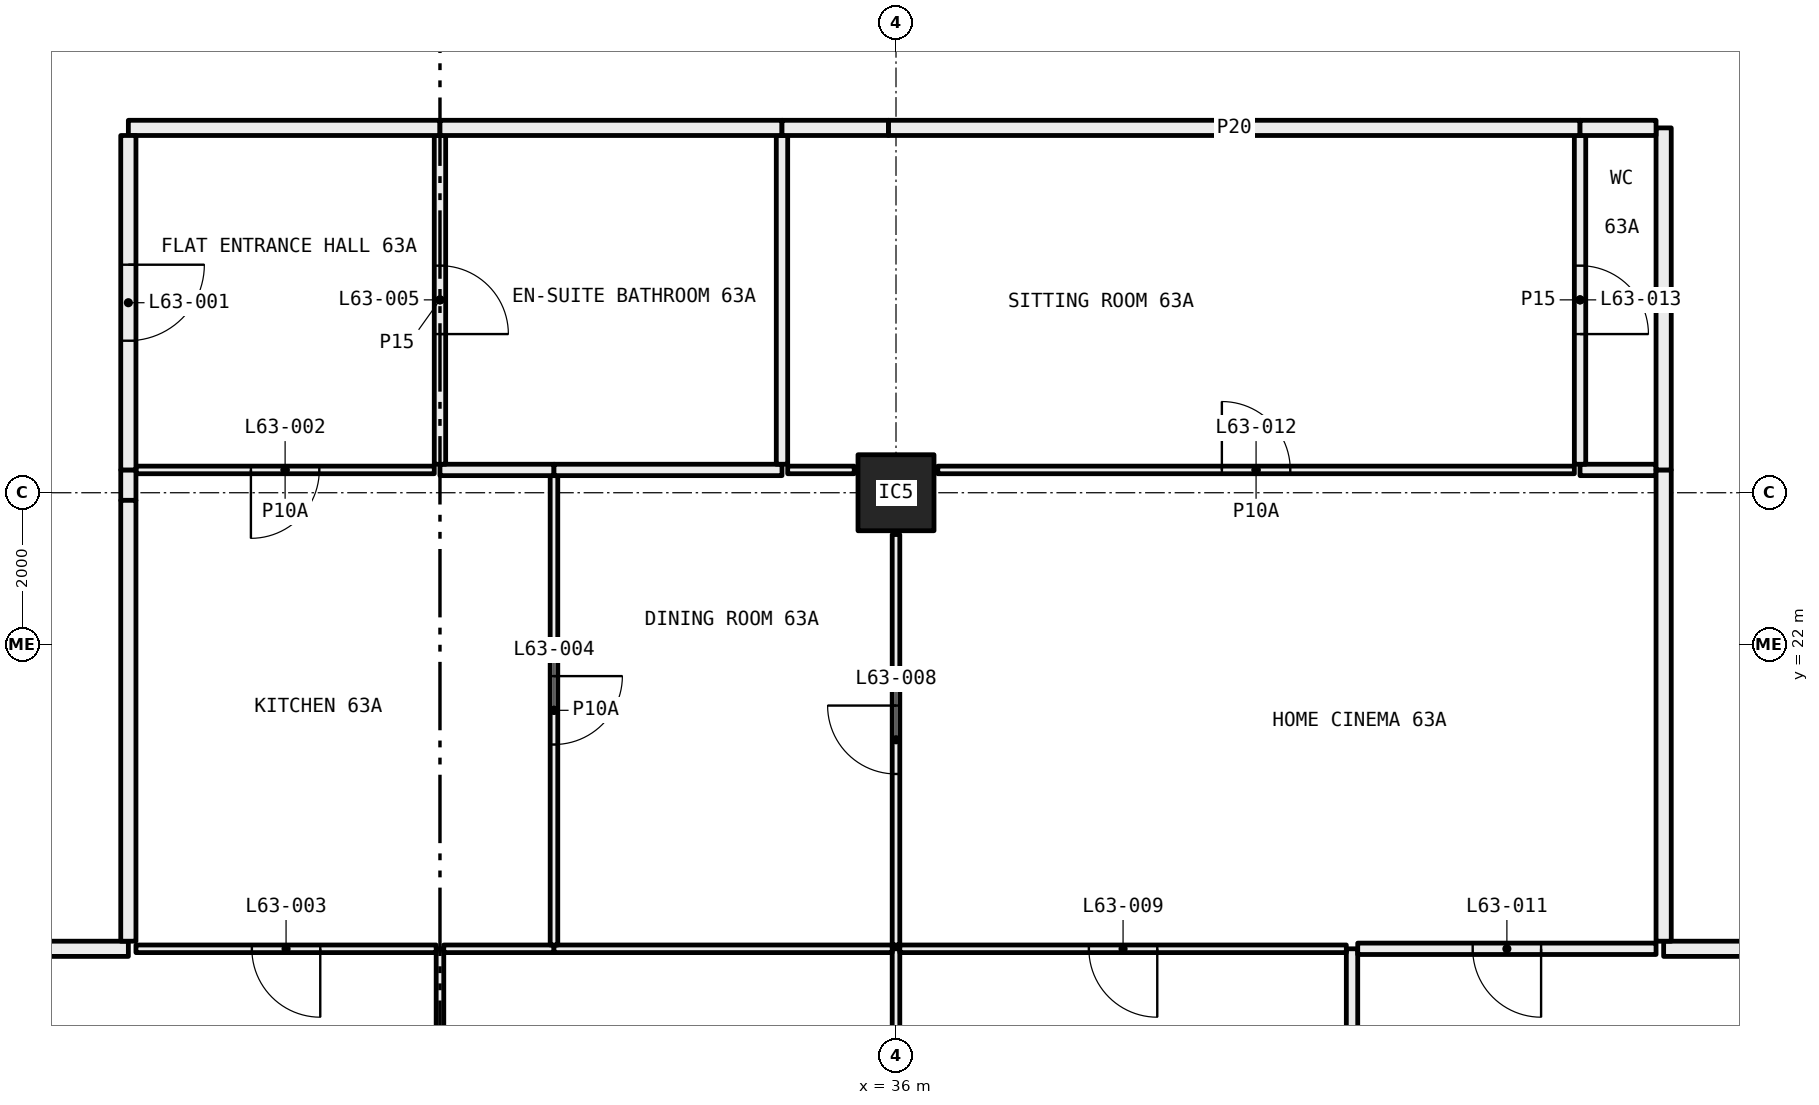
"""IFC4 building model, lengths in metres.
Left out: names, types, materials, properties, quantities, classifications, styles, units other than length and angle.
Written with IfcOpenShell. Run it as: python <this file> out.ifc"""

import sys

from ifc_helpers import new_model, si_unit, direction, frame, frame_2d, origin, origin_2d, place, context, subcontext, project, spatial, rectangle, hollow_rectangle, extrude, element, fill, save


model = new_model("IFC4")
c1 = context("Model", 3, precision=1e-05, world=origin(), true_north=direction((0.0, 1.0)))
c2 = subcontext(c1, "Body", "Model", "MODEL_VIEW")
j1 = project(units=[si_unit("LENGTHUNIT", "METRE"), si_unit("PLANEANGLEUNIT", "RADIAN")], contexts=[c1])
p1 = place(None, origin())
s1 = spatial("IfcSite", under=j1, at=p1, CompositionType="ELEMENT")
p2 = place(p1, origin())
s2 = spatial("IfcBuilding", under=s1, at=p2, CompositionType="ELEMENT")
p3 = place(p2, frame((0.0, 0.0, 235.2)))
s3 = spatial("IfcBuildingStorey", under=s2, at=p3, CompositionType="ELEMENT", Elevation=235.2)
p4 = place(p3, frame((36.0, 24.0, 0.0), z_axis=(0.0, 0.0, 1.0), x_axis=(1.0, 0.0, 0.0)))
e1 = element("IfcColumn", 1, at=p4, inside=s3, PredefinedType="COLUMN", context=c2, shape_type="SweptSolid", body=[
    extrude(hollow_rectangle(XDim=1.0, YDim=1.0, WallThickness=0.04, at=origin_2d()), origin(), (0.0, 0.0, 1.0), 3.05),
])
p5 = place(p3, frame((30.0, 12.72, 0.0), z_axis=(0.0, 0.0, 1.0), x_axis=(0.0, 1.0, 0.0)))
e2 = element("IfcWall", 2, at=p5, inside=s3, PredefinedType="PARTITIONING", context=c2, shape_type="SweptSolid", body=[
    extrude(rectangle(XDim=5.28, YDim=0.1, at=frame_2d((2.64, 0.0))), origin(), (0.0, 0.0, 1.0), 3.05),
])
p6 = place(p5, frame((2.19, 0.0, 0.0)))
e3 = element("IfcOpeningElement", 3, at=p6, cuts=e2, PredefinedType="OPENING", context=c2, shape_type="SweptSolid", body=[
    extrude(rectangle(XDim=0.9, YDim=2.1, at=frame_2d((0.45, 1.05))), frame((0.0, 0.06, 0.0), z_axis=(0.0, -1.0, 0.0), x_axis=(1.0, 0.0, 0.0)), (0.0, 0.0, 1.0), 0.12),
])
p7 = place(p3, frame((29.95, 18.0, 0.0), z_axis=(0.0, 0.0, 1.0), x_axis=(-1.0, 0.0, 0.0)))
e4 = element("IfcWall", 4, at=p7, inside=s3, PredefinedType="PARTITIONING", context=c2, shape_type="SweptSolid", body=[
    extrude(rectangle(XDim=3.95, YDim=0.1, at=frame_2d((1.975, 0.0))), origin(), (0.0, 0.0, 1.0), 3.05),
])
p8 = place(p7, frame((1.525, 0.0, 0.0)))
e5 = element("IfcOpeningElement", 5, at=p8, cuts=e4, PredefinedType="OPENING", context=c2, shape_type="SweptSolid", body=[
    extrude(rectangle(XDim=0.9, YDim=2.1, at=frame_2d((0.45, 1.05))), frame((0.0, 0.06, 0.0), z_axis=(0.0, -1.0, 0.0), x_axis=(1.0, 0.0, 0.0)), (0.0, 0.0, 1.0), 0.12),
])
p9 = place(p3, frame((25.9, 18.0, 0.0), z_axis=(0.0, 0.0, 1.0), x_axis=(-1.0, 0.0, 0.0)))
e6 = element("IfcWall", 6, at=p9, inside=s3, PredefinedType="PARTITIONING", context=c2, shape_type="SweptSolid", body=[
    extrude(rectangle(XDim=1.9, YDim=0.2, at=frame_2d((0.95, 0.0))), origin(), (0.0, 0.0, 1.0), 3.05),
])
p10 = place(p3, frame((36.0, 12.72, 0.0), z_axis=(0.0, 0.0, 1.0), x_axis=(0.0, 1.0, 0.0)))
e7 = element("IfcWall", 7, at=p10, inside=s3, PredefinedType="PARTITIONING", context=c2, shape_type="SweptSolid", body=[
    extrude(rectangle(XDim=5.28, YDim=0.1, at=frame_2d((2.64, 0.0))), origin(), (0.0, 0.0, 1.0), 2.45),
])
p11 = place(p3, frame((31.5, 18.0, 0.0), z_axis=(0.0, 0.0, 1.0), x_axis=(-1.0, 0.0, 0.0)))
e8 = element("IfcWall", 8, at=p11, inside=s3, PredefinedType="PARTITIONING", context=c2, shape_type="SweptSolid", body=[
    extrude(rectangle(XDim=1.45, YDim=0.1, at=frame_2d((0.725, 0.0))), origin(), (0.0, 0.0, 1.0), 3.05),
])
p12 = place(p3, frame((35.95, 18.0, 0.0), z_axis=(0.0, 0.0, 1.0), x_axis=(-1.0, 0.0, 0.0)))
e9 = element("IfcWall", 9, at=p12, inside=s3, PredefinedType="PARTITIONING", context=c2, shape_type="SweptSolid", body=[
    extrude(rectangle(XDim=4.45, YDim=0.1, at=frame_2d((2.225, 0.0))), origin(), (0.0, 0.0, 1.0), 2.45),
])
p13 = place(p3, frame((42.0, 15.0, 0.0), z_axis=(0.0, 0.0, 1.0), x_axis=(0.0, 1.0, 0.0)))
e10 = element("IfcWall", 10, at=p13, inside=s3, PredefinedType="PARTITIONING", context=c2, shape_type="SweptSolid", body=[
    extrude(rectangle(XDim=3.0, YDim=0.15, at=frame_2d((1.5, 0.0))), origin(), (0.0, 0.0, 1.0), 3.05),
])
p14 = place(p3, frame((41.925, 18.0, 0.0), z_axis=(0.0, 0.0, 1.0), x_axis=(-1.0, 0.0, 0.0)))
e11 = element("IfcWall", 11, at=p14, inside=s3, PredefinedType="PARTITIONING", context=c2, shape_type="SweptSolid", body=[
    extrude(rectangle(XDim=5.875, YDim=0.1, at=frame_2d((2.938, 0.0))), origin(), (0.0, 0.0, 1.0), 2.45),
])
p15 = place(p14, frame((2.488, 0.0, 0.0)))
e12 = element("IfcOpeningElement", 12, at=p15, cuts=e11, PredefinedType="OPENING", context=c2, shape_type="SweptSolid", body=[
    extrude(rectangle(XDim=0.9, YDim=2.1, at=frame_2d((0.45, 1.05))), frame((0.0, 0.06, 0.0), z_axis=(0.0, -1.0, 0.0), x_axis=(1.0, 0.0, 0.0)), (0.0, 0.0, 1.0), 0.12),
])
p16 = place(p3, frame((46.0, 18.0, 0.0), z_axis=(0.0, 0.0, 1.0), x_axis=(-1.0, 0.0, 0.0)))
e13 = element("IfcWall", 13, at=p16, inside=s3, PredefinedType="PARTITIONING", context=c2, shape_type="SweptSolid", body=[
    extrude(rectangle(XDim=3.925, YDim=0.15, at=frame_2d((1.962, 0.0))), origin(), (0.0, 0.0, 1.0), 3.05),
])
p17 = place(p16, frame((1.512, 0.0, 0.0)))
e14 = element("IfcOpeningElement", 14, at=p17, cuts=e13, PredefinedType="OPENING", context=c2, shape_type="SweptSolid", body=[
    extrude(rectangle(XDim=0.9, YDim=2.1, at=frame_2d((0.45, 1.05))), frame((0.0, 0.085, 0.0), z_axis=(0.0, -1.0, 0.0), x_axis=(1.0, 0.0, 0.0)), (0.0, 0.0, 1.0), 0.17),
])
p18 = place(p3, frame((47.9, 18.0, 0.0), z_axis=(0.0, 0.0, 1.0), x_axis=(-1.0, 0.0, 0.0)))
e15 = element("IfcWall", 15, at=p18, inside=s3, PredefinedType="PARTITIONING", context=c2, shape_type="SweptSolid", body=[
    extrude(rectangle(XDim=1.8, YDim=0.2, at=frame_2d((0.9, 0.0))), origin(), (0.0, 0.0, 1.0), 3.05),
])
p19 = place(p3, frame((31.5, 18.05, 0.0), z_axis=(0.0, 0.0, 1.0), x_axis=(0.0, 1.0, 0.0)))
e16 = element("IfcWall", 16, at=p19, inside=s3, PredefinedType="PARTITIONING", context=c2, shape_type="SweptSolid", body=[
    extrude(rectangle(XDim=6.175, YDim=0.1, at=frame_2d((3.087, 0.0))), origin(), (0.0, 0.0, 1.0), 2.45),
])
p20 = place(p19, frame((2.637, 0.0, 0.0)))
e17 = element("IfcOpeningElement", 17, at=p20, cuts=e16, PredefinedType="OPENING", context=c2, shape_type="SweptSolid", body=[
    extrude(rectangle(XDim=0.9, YDim=2.1, at=frame_2d((0.45, 1.05))), frame((0.0, 0.06, 0.0), z_axis=(0.0, -1.0, 0.0), x_axis=(1.0, 0.0, 0.0)), (0.0, 0.0, 1.0), 0.12),
])
p21 = place(p3, frame((29.925, 24.3, 0.0), z_axis=(0.0, 0.0, 1.0), x_axis=(-1.0, 0.0, 0.0)))
e18 = element("IfcWall", 18, at=p21, inside=s3, PredefinedType="PARTITIONING", context=c2, shape_type="SweptSolid", body=[
    extrude(rectangle(XDim=3.925, YDim=0.1, at=frame_2d((1.962, 0.0))), origin(), (0.0, 0.0, 1.0), 3.05),
])
p22 = place(p21, frame((1.512, 0.0, 0.0)))
e19 = element("IfcOpeningElement", 19, at=p22, cuts=e18, PredefinedType="OPENING", context=c2, shape_type="SweptSolid", body=[
    extrude(rectangle(XDim=0.9, YDim=2.1, at=frame_2d((0.45, 1.05))), frame((0.0, 0.06, 0.0), z_axis=(0.0, -1.0, 0.0), x_axis=(1.0, 0.0, 0.0)), (0.0, 0.0, 1.0), 0.12),
])
p23 = place(p3, frame((31.5, 24.3, 0.0), z_axis=(0.0, 0.0, 1.0), x_axis=(-1.0, 0.0, 0.0)))
e20 = element("IfcWall", 20, at=p23, inside=s3, PredefinedType="PARTITIONING", context=c2, shape_type="SweptSolid", body=[
    extrude(rectangle(XDim=1.5, YDim=0.15, at=frame_2d((0.75, 0.0))), origin(), (0.0, 0.0, 1.0), 3.05),
])
p24 = place(p3, frame((25.9, 24.3, 0.0), z_axis=(0.0, 0.0, 1.0), x_axis=(0.0, -1.0, 0.0)))
e21 = element("IfcWall", 21, at=p24, inside=s3, PredefinedType="PARTITIONING", context=c2, shape_type="SweptSolid", body=[
    extrude(rectangle(XDim=0.4, YDim=0.2, at=frame_2d((0.2, 0.0))), origin(), (0.0, 0.0, 1.0), 2.45),
])
p25 = place(p3, frame((25.9, 23.9, 0.0), z_axis=(0.0, 0.0, 1.0), x_axis=(0.0, -1.0, 0.0)))
e22 = element("IfcWall", 22, at=p25, inside=s3, PredefinedType="PARTITIONING", context=c2, shape_type="SweptSolid", body=[
    extrude(rectangle(XDim=5.8, YDim=0.2, at=frame_2d((2.9, 0.0))), origin(), (0.0, 0.0, 1.0), 3.05),
])
p26 = place(p3, frame((36.0, 18.05, 0.0), z_axis=(0.0, 0.0, 1.0), x_axis=(0.0, 1.0, 0.0)))
e23 = element("IfcWall", 23, at=p26, inside=s3, PredefinedType="PARTITIONING", context=c2, shape_type="SweptSolid", body=[
    extrude(rectangle(XDim=5.4, YDim=0.1, at=frame_2d((2.7, 0.0))), origin(), (0.0, 0.0, 1.0), 2.45),
])
p27 = place(p26, frame((2.25, 0.0, 0.0)))
e24 = element("IfcOpeningElement", 24, at=p27, cuts=e23, PredefinedType="OPENING", context=c2, shape_type="SweptSolid", body=[
    extrude(rectangle(XDim=0.9, YDim=2.1, at=frame_2d((0.45, 1.05))), frame((0.0, 0.06, 0.0), z_axis=(0.0, -1.0, 0.0), x_axis=(1.0, 0.0, 0.0)), (0.0, 0.0, 1.0), 0.12),
])
p28 = place(p3, frame((34.5, 24.3, 0.0), z_axis=(0.0, 0.0, 1.0), x_axis=(-1.0, 0.0, 0.0)))
e25 = element("IfcWall", 25, at=p28, inside=s3, PredefinedType="PARTITIONING", context=c2, shape_type="SweptSolid", body=[
    extrude(rectangle(XDim=3.0, YDim=0.15, at=frame_2d((1.5, 0.0))), origin(), (0.0, 0.0, 1.0), 3.05),
])
p29 = place(p3, frame((35.45, 24.3, 0.0), z_axis=(0.0, 0.0, 1.0), x_axis=(-1.0, 0.0, 0.0)))
e26 = element("IfcWall", 26, at=p29, inside=s3, PredefinedType="PARTITIONING", context=c2, shape_type="SweptSolid", body=[
    extrude(rectangle(XDim=0.875, YDim=0.1, at=frame_2d((0.438, 0.0))), origin(), (0.0, 0.0, 1.0), 3.05),
])
p30 = place(p3, frame((44.925, 24.3, 0.0), z_axis=(0.0, 0.0, 1.0), x_axis=(-1.0, 0.0, 0.0)))
e27 = element("IfcWall", 27, at=p30, inside=s3, PredefinedType="PARTITIONING", context=c2, shape_type="SweptSolid", body=[
    extrude(rectangle(XDim=8.375, YDim=0.1, at=frame_2d((4.188, 0.0))), origin(), (0.0, 0.0, 1.0), 3.05),
])
p31 = place(p30, frame((3.738, 0.0, 0.0)))
e28 = element("IfcOpeningElement", 28, at=p31, cuts=e27, PredefinedType="OPENING", context=c2, shape_type="SweptSolid", body=[
    extrude(rectangle(XDim=0.9, YDim=2.1, at=frame_2d((0.45, 1.05))), frame((0.0, 0.06, 0.0), z_axis=(0.0, -1.0, 0.0), x_axis=(1.0, 0.0, 0.0)), (0.0, 0.0, 1.0), 0.12),
])
p32 = place(p3, frame((46.0, 24.3, 0.0), z_axis=(0.0, 0.0, 1.0), x_axis=(-1.0, 0.0, 0.0)))
e29 = element("IfcWall", 29, at=p32, inside=s3, PredefinedType="PARTITIONING", context=c2, shape_type="SweptSolid", body=[
    extrude(rectangle(XDim=1.0, YDim=0.15, at=frame_2d((0.5, 0.0))), origin(), (0.0, 0.0, 1.0), 3.05),
])
p33 = place(p3, frame((46.1, 18.1, 0.0), z_axis=(0.0, 0.0, 1.0), x_axis=(0.0, 1.0, 0.0)))
e30 = element("IfcWall", 30, at=p33, inside=s3, PredefinedType="PARTITIONING", context=c2, shape_type="SweptSolid", body=[
    extrude(rectangle(XDim=6.2, YDim=0.2, at=frame_2d((3.1, 0.0))), origin(), (0.0, 0.0, 1.0), 2.45),
])
p34 = place(p3, frame((30.0, 24.375, 0.0), z_axis=(0.0, 0.0, 1.0), x_axis=(0.0, 1.0, 0.0)))
e31 = element("IfcWall", 31, at=p34, inside=s3, PredefinedType="PARTITIONING", context=c2, shape_type="SweptSolid", body=[
    extrude(rectangle(XDim=4.325, YDim=0.15, at=frame_2d((2.163, 0.0))), origin(), (0.0, 0.0, 1.0), 3.05),
])
p35 = place(p34, frame((1.712, 0.0, 0.0)))
e32 = element("IfcOpeningElement", 32, at=p35, cuts=e31, PredefinedType="OPENING", context=c2, shape_type="SweptSolid", body=[
    extrude(rectangle(XDim=0.9, YDim=2.1, at=frame_2d((0.45, 1.05))), frame((0.0, 0.085, 0.0), z_axis=(0.0, -1.0, 0.0), x_axis=(1.0, 0.0, 0.0)), (0.0, 0.0, 1.0), 0.17),
])
p36 = place(p3, frame((30.0, 28.8, 0.0), z_axis=(0.0, 0.0, 1.0), x_axis=(-1.0, 0.0, 0.0)))
e33 = element("IfcWall", 33, at=p36, inside=s3, PredefinedType="PARTITIONING", context=c2, shape_type="SweptSolid", body=[
    extrude(rectangle(XDim=4.1, YDim=0.2, at=frame_2d((2.05, 0.0))), origin(), (0.0, 0.0, 1.0), 3.05),
])
p37 = place(p3, frame((25.9, 28.7, 0.0), z_axis=(0.0, 0.0, 1.0), x_axis=(0.0, -1.0, 0.0)))
e34 = element("IfcWall", 34, at=p37, inside=s3, PredefinedType="PARTITIONING", context=c2, shape_type="SweptSolid", body=[
    extrude(rectangle(XDim=4.4, YDim=0.2, at=frame_2d((2.2, 0.0))), origin(), (0.0, 0.0, 1.0), 3.05),
])
p38 = place(p37, frame((1.7, 0.0, 0.0)))
e35 = element("IfcOpeningElement", 35, at=p38, cuts=e34, PredefinedType="OPENING", context=c2, shape_type="SweptSolid", body=[
    extrude(rectangle(XDim=1.0, YDim=2.1, at=frame_2d((0.5, 1.05))), frame((0.0, 0.11, 0.0), z_axis=(0.0, -1.0, 0.0), x_axis=(1.0, 0.0, 0.0)), (0.0, 0.0, 1.0), 0.22),
])
p39 = place(p3, frame((34.5, 24.375, 0.0), z_axis=(0.0, 0.0, 1.0), x_axis=(0.0, 1.0, 0.0)))
e36 = element("IfcWall", 36, at=p39, inside=s3, PredefinedType="PARTITIONING", context=c2, shape_type="SweptSolid", body=[
    extrude(rectangle(XDim=4.325, YDim=0.15, at=frame_2d((2.163, 0.0))), origin(), (0.0, 0.0, 1.0), 3.05),
])
p40 = place(p3, frame((34.5, 28.8, 0.0), z_axis=(0.0, 0.0, 1.0), x_axis=(-1.0, 0.0, 0.0)))
e37 = element("IfcWall", 37, at=p40, inside=s3, PredefinedType="PARTITIONING", context=c2, shape_type="SweptSolid", body=[
    extrude(rectangle(XDim=4.5, YDim=0.2, at=frame_2d((2.25, 0.0))), origin(), (0.0, 0.0, 1.0), 3.05),
])
p41 = place(p3, frame((45.0, 24.375, 0.0), z_axis=(0.0, 0.0, 1.0), x_axis=(0.0, 1.0, 0.0)))
e38 = element("IfcWall", 38, at=p41, inside=s3, PredefinedType="PARTITIONING", context=c2, shape_type="SweptSolid", body=[
    extrude(rectangle(XDim=4.325, YDim=0.15, at=frame_2d((2.163, 0.0))), origin(), (0.0, 0.0, 1.0), 3.05),
])
p42 = place(p41, frame((1.712, 0.0, 0.0)))
e39 = element("IfcOpeningElement", 39, at=p42, cuts=e38, PredefinedType="OPENING", context=c2, shape_type="SweptSolid", body=[
    extrude(rectangle(XDim=0.9, YDim=2.1, at=frame_2d((0.45, 1.05))), frame((0.0, 0.085, 0.0), z_axis=(0.0, -1.0, 0.0), x_axis=(1.0, 0.0, 0.0)), (0.0, 0.0, 1.0), 0.17),
])
p43 = place(p3, frame((45.0, 28.8, 0.0), z_axis=(0.0, 0.0, 1.0), x_axis=(-1.0, 0.0, 0.0)))
e40 = element("IfcWall", 40, at=p43, inside=s3, PredefinedType="PARTITIONING", context=c2, shape_type="SweptSolid", body=[
    extrude(rectangle(XDim=9.1, YDim=0.2, at=frame_2d((4.55, 0.0))), origin(), (0.0, 0.0, 1.0), 2.45),
])
p44 = place(p3, frame((35.9, 28.8, 0.0), z_axis=(0.0, 0.0, 1.0), x_axis=(-1.0, 0.0, 0.0)))
e41 = element("IfcWall", 41, at=p44, inside=s3, PredefinedType="PARTITIONING", context=c2, shape_type="SweptSolid", body=[
    extrude(rectangle(XDim=1.4, YDim=0.2, at=frame_2d((0.7, 0.0))), origin(), (0.0, 0.0, 1.0), 3.05),
])
p45 = place(p3, frame((46.1, 24.3, 0.0), z_axis=(0.0, 0.0, 1.0), x_axis=(0.0, 1.0, 0.0)))
e42 = element("IfcWall", 42, at=p45, inside=s3, PredefinedType="PARTITIONING", context=c2, shape_type="SweptSolid", body=[
    extrude(rectangle(XDim=4.5, YDim=0.2, at=frame_2d((2.25, 0.0))), origin(), (0.0, 0.0, 1.0), 3.05),
])
p46 = place(p3, frame((46.0, 28.8, 0.0), z_axis=(0.0, 0.0, 1.0), x_axis=(-1.0, 0.0, 0.0)))
e43 = element("IfcWall", 43, at=p46, inside=s3, PredefinedType="PARTITIONING", context=c2, shape_type="SweptSolid", body=[
    extrude(rectangle(XDim=1.0, YDim=0.2, at=frame_2d((0.5, 0.0))), origin(), (0.0, 0.0, 1.0), 3.05),
])
p47 = place(p38, origin())
e44 = element("IfcDoor", 44, at=p47, inside=s3, OperationType="SINGLE_SWING_RIGHT", PredefinedType="DOOR", context=c2, shape_type="SweptSolid", body=[
    extrude(rectangle(XDim=1.0, YDim=2.1, at=frame_2d((0.5, 1.05))), frame((0.0, 0.025, 0.0), z_axis=(0.0, -1.0, 0.0), x_axis=(1.0, 0.0, 0.0)), (0.0, 0.0, 1.0), 0.05),
])
fill(e35, e44)
p48 = place(p22, origin())
e45 = element("IfcDoor", 45, at=p48, inside=s3, OperationType="SINGLE_SWING_LEFT", PredefinedType="DOOR", context=c2, shape_type="SweptSolid", body=[
    extrude(rectangle(XDim=0.9, YDim=2.1, at=frame_2d((0.45, 1.05))), frame((0.0, 0.025, 0.0), z_axis=(0.0, -1.0, 0.0), x_axis=(1.0, 0.0, 0.0)), (0.0, 0.0, 1.0), 0.05),
])
fill(e19, e45)
p49 = place(p8, origin())
e46 = element("IfcDoor", 46, at=p49, inside=s3, OperationType="SINGLE_SWING_RIGHT", PredefinedType="DOOR", context=c2, shape_type="SweptSolid", body=[
    extrude(rectangle(XDim=0.9, YDim=2.1, at=frame_2d((0.45, 1.05))), frame((0.0, 0.025, 0.0), z_axis=(0.0, -1.0, 0.0), x_axis=(1.0, 0.0, 0.0)), (0.0, 0.0, 1.0), 0.05),
])
fill(e5, e46)
p50 = place(p20, frame((0.9, 0.0, 0.0), x_axis=(-1.0, 0.0, 0.0)))
e47 = element("IfcDoor", 47, at=p50, inside=s3, OperationType="SINGLE_SWING_RIGHT", PredefinedType="DOOR", context=c2, shape_type="SweptSolid", body=[
    extrude(rectangle(XDim=0.9, YDim=2.1, at=frame_2d((0.45, 1.05))), frame((0.0, 0.025, 0.0), z_axis=(0.0, -1.0, 0.0), x_axis=(1.0, 0.0, 0.0)), (0.0, 0.0, 1.0), 0.05),
])
fill(e17, e47)
p51 = place(p35, frame((0.9, 0.0, 0.0), x_axis=(-1.0, 0.0, 0.0)))
e48 = element("IfcDoor", 48, at=p51, inside=s3, OperationType="SINGLE_SWING_LEFT", PredefinedType="DOOR", context=c2, shape_type="SweptSolid", body=[
    extrude(rectangle(XDim=0.9, YDim=2.1, at=frame_2d((0.45, 1.05))), frame((0.0, 0.025, 0.0), z_axis=(0.0, -1.0, 0.0), x_axis=(1.0, 0.0, 0.0)), (0.0, 0.0, 1.0), 0.05),
])
fill(e32, e48)
p52 = place(p27, origin())
e49 = element("IfcDoor", 49, at=p52, inside=s3, OperationType="SINGLE_SWING_LEFT", PredefinedType="DOOR", context=c2, shape_type="SweptSolid", body=[
    extrude(rectangle(XDim=0.9, YDim=2.1, at=frame_2d((0.45, 1.05))), frame((0.0, 0.025, 0.0), z_axis=(0.0, -1.0, 0.0), x_axis=(1.0, 0.0, 0.0)), (0.0, 0.0, 1.0), 0.05),
])
fill(e24, e49)
p53 = place(p15, origin())
e50 = element("IfcDoor", 50, at=p53, inside=s3, OperationType="SINGLE_SWING_RIGHT", PredefinedType="DOOR", context=c2, shape_type="SweptSolid", body=[
    extrude(rectangle(XDim=0.9, YDim=2.1, at=frame_2d((0.45, 1.05))), frame((0.0, 0.025, 0.0), z_axis=(0.0, -1.0, 0.0), x_axis=(1.0, 0.0, 0.0)), (0.0, 0.0, 1.0), 0.05),
])
fill(e12, e50)
p54 = place(p17, origin())
e51 = element("IfcDoor", 51, at=p54, inside=s3, OperationType="SINGLE_SWING_RIGHT", PredefinedType="DOOR", context=c2, shape_type="SweptSolid", body=[
    extrude(rectangle(XDim=0.9, YDim=2.1, at=frame_2d((0.45, 1.05))), frame((0.0, 0.025, 0.0), z_axis=(0.0, -1.0, 0.0), x_axis=(1.0, 0.0, 0.0)), (0.0, 0.0, 1.0), 0.05),
])
fill(e14, e51)
p55 = place(p31, frame((0.9, 0.0, 0.0), x_axis=(-1.0, 0.0, 0.0)))
e52 = element("IfcDoor", 52, at=p55, inside=s3, OperationType="SINGLE_SWING_RIGHT", PredefinedType="DOOR", context=c2, shape_type="SweptSolid", body=[
    extrude(rectangle(XDim=0.9, YDim=2.1, at=frame_2d((0.45, 1.05))), frame((0.0, 0.025, 0.0), z_axis=(0.0, -1.0, 0.0), x_axis=(1.0, 0.0, 0.0)), (0.0, 0.0, 1.0), 0.05),
])
fill(e28, e52)
p56 = place(p42, frame((0.9, 0.0, 0.0), x_axis=(-1.0, 0.0, 0.0)))
e53 = element("IfcDoor", 53, at=p56, inside=s3, OperationType="SINGLE_SWING_LEFT", PredefinedType="DOOR", context=c2, shape_type="SweptSolid", body=[
    extrude(rectangle(XDim=0.9, YDim=2.1, at=frame_2d((0.45, 1.05))), frame((0.0, 0.025, 0.0), z_axis=(0.0, -1.0, 0.0), x_axis=(1.0, 0.0, 0.0)), (0.0, 0.0, 1.0), 0.05),
])
fill(e39, e53)
save(model, sys.argv[1])
